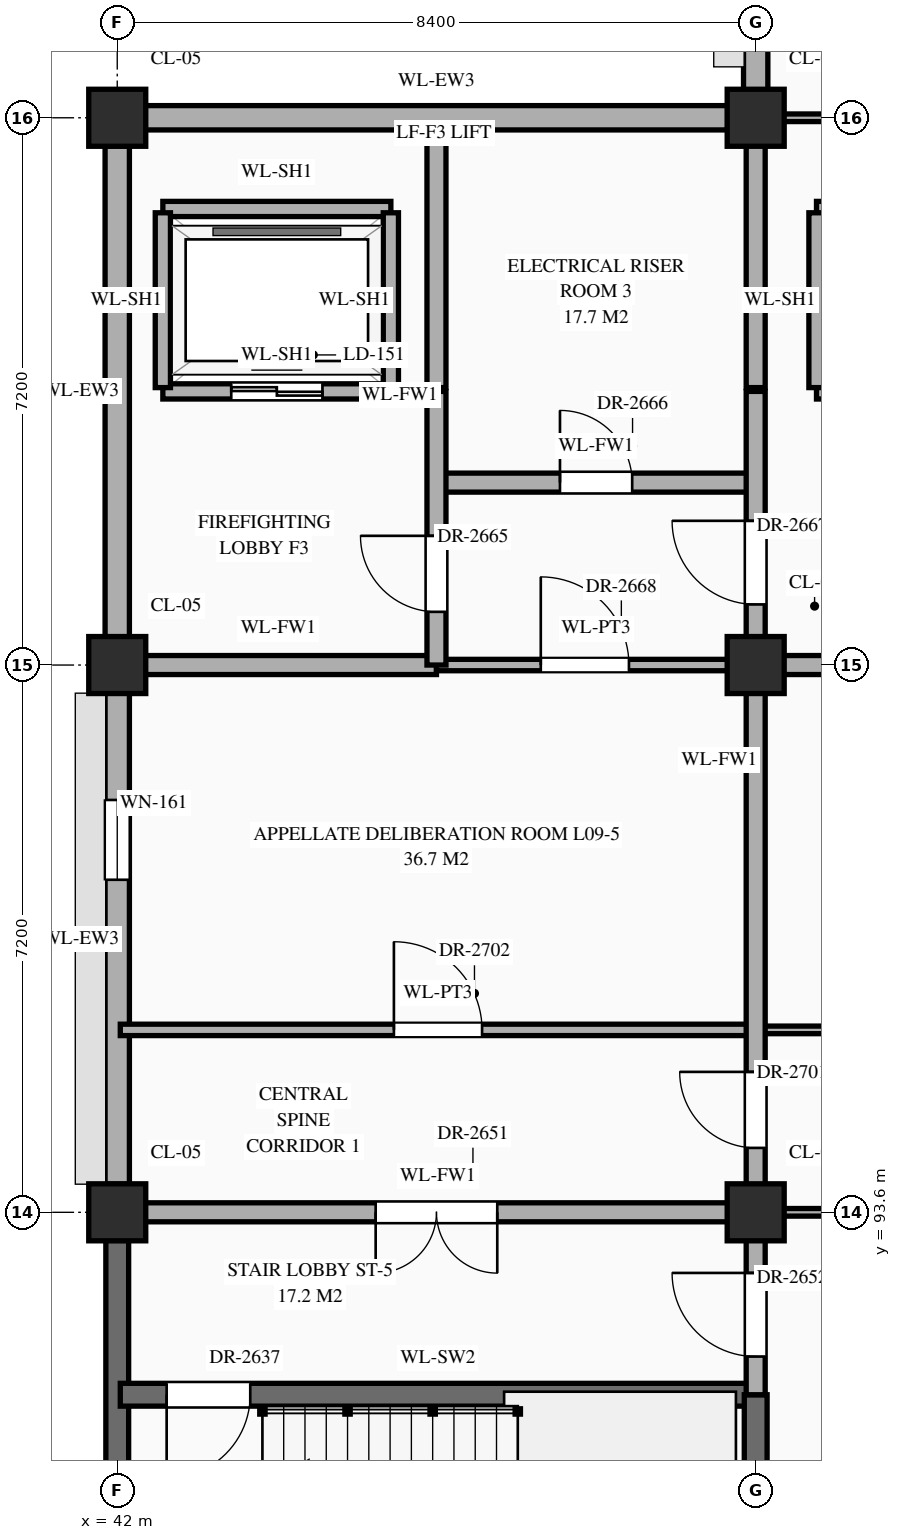
"""IFC4 building model, lengths in metres.
Left out: names, types, materials, properties, quantities, classifications, styles, units other than length and angle.
Written with IfcOpenShell. Run it as: python <this file> out.ifc"""

import sys

from ifc_helpers import new_model, si_unit, direction, frame, frame_2d, origin, origin_2d, place, context, subcontext, project, spatial, rectangle, extrude, element, fill, save


model = new_model("IFC4")
c1 = context("Model", 3, precision=1e-05, world=origin(), true_north=direction((0.0, 1.0)))
c2 = subcontext(c1, "Body", "Model", "MODEL_VIEW")
j1 = project(units=[si_unit("LENGTHUNIT", "METRE"), si_unit("PLANEANGLEUNIT", "RADIAN")], contexts=[c1])
p1 = place(None, origin())
s1 = spatial("IfcSite", under=j1, at=p1, CompositionType="ELEMENT")
p2 = place(p1, origin())
s2 = spatial("IfcBuilding", under=s1, at=p2, CompositionType="ELEMENT")
p3 = place(p2, frame((0.0, 0.0, 39.3)))
s3 = spatial("IfcBuildingStorey", under=s2, at=p3, CompositionType="ELEMENT", Elevation=39.3)
for number, where, z_axis, x_axis in (
    (1, (42.0, 93.6, 0.0), (0.0, 0.0, 1.0), (1.0, 0.0, 0.0)),
    (2, (42.0, 100.8, 0.0), (0.0, 0.0, 1.0), (1.0, 0.0, 0.0)),
    (3, (42.0, 108.0, 0.0), (0.0, 0.0, 1.0), (1.0, 0.0, 0.0)),
    (4, (50.4, 93.6, 0.0), (0.0, 0.0, 1.0), (1.0, 0.0, 0.0)),
    (5, (50.4, 100.8, 0.0), (0.0, 0.0, 1.0), (1.0, 0.0, 0.0)),
    (6, (50.4, 108.0, 0.0), (0.0, 0.0, 1.0), (1.0, 0.0, 0.0)),
):
    element("IfcColumn", number, at=place(p3, frame(where, z_axis=z_axis, x_axis=x_axis)), inside=s3, PredefinedType="COLUMN", context=c2, shape_type="SweptSolid", body=[
        extrude(rectangle(XDim=0.75, YDim=0.75, at=origin_2d()), origin(), (0.0, 0.0, 1.0), 4.2),
    ])
p4 = place(p3, frame((42.0, 86.77, 0.0), z_axis=(0.0, 0.0, 1.0), x_axis=(0.0, 1.0, 0.0)))
e7 = element("IfcWall", 7, at=p4, inside=s3, PredefinedType="SHEAR", context=c2, shape_type="SweptSolid", body=[
    extrude(rectangle(XDim=6.46, YDim=0.3, at=frame_2d((3.23, 0.0))), origin(), (0.0, 0.0, 1.0), 3.95),
])
p5 = place(p3, frame((42.0, 93.97, 0.0), z_axis=(0.0, 0.0, 1.0), x_axis=(0.0, 1.0, 0.0)))
e8 = element("IfcWall", 8, at=p5, inside=s3, PredefinedType="STANDARD", context=c2, shape_type="SweptSolid", body=[
    extrude(rectangle(XDim=6.46, YDim=0.32, at=frame_2d((3.23, 0.0))), origin(), (0.0, 0.0, 1.0), 3.3),
])
p6 = place(p5, frame((4.005, 0.0, 0.85)))
e9 = element("IfcOpeningElement", 9, at=p6, cuts=e8, PredefinedType="OPENING", context=c2, shape_type="SweptSolid", body=[
    extrude(rectangle(XDim=1.05, YDim=1.38, at=frame_2d((0.525, 0.69))), frame((0.0, 0.172, 0.0), z_axis=(0.0, -1.0, 0.0), x_axis=(1.0, 0.0, 0.0)), (0.0, 0.0, 1.0), 0.344),
])
p7 = place(p3, frame((42.37, 108.0, 0.0), z_axis=(0.0, 0.0, 1.0), x_axis=(1.0, 0.0, 0.0)))
e10 = element("IfcWall", 10, at=p7, inside=s3, PredefinedType="STANDARD", context=c2, shape_type="SweptSolid", body=[
    extrude(rectangle(XDim=7.66, YDim=0.32, at=frame_2d((3.83, 0.0))), origin(), (0.0, 0.0, 1.0), 3.3),
])
p8 = place(p3, frame((42.0, 101.17, 0.0), z_axis=(0.0, 0.0, 1.0), x_axis=(0.0, 1.0, 0.0)))
e11 = element("IfcWall", 11, at=p8, inside=s3, PredefinedType="STANDARD", context=c2, shape_type="SweptSolid", body=[
    extrude(rectangle(XDim=6.46, YDim=0.32, at=frame_2d((3.23, 0.0))), origin(), (0.0, 0.0, 1.0), 3.3),
])
p9 = place(p3, frame((50.4, 108.37, 0.0), z_axis=(0.0, 0.0, 1.0), x_axis=(0.0, 1.0, 0.0)))
e12 = element("IfcWall", 12, at=p9, inside=s3, PredefinedType="STANDARD", context=c2, shape_type="SweptSolid", body=[
    extrude(rectangle(XDim=6.46, YDim=0.32, at=frame_2d((3.23, 0.0))), origin(), (0.0, 0.0, 1.0), 3.3),
])
p10 = place(p9, frame((4.005, 0.0, 0.85)))
e13 = element("IfcOpeningElement", 13, at=p10, cuts=e12, PredefinedType="OPENING", context=c2, shape_type="SweptSolid", body=[
    extrude(rectangle(XDim=1.05, YDim=1.92, at=frame_2d((0.525, 0.96))), frame((0.0, 0.172, 0.0), z_axis=(0.0, -1.0, 0.0), x_axis=(1.0, 0.0, 0.0)), (0.0, 0.0, 1.0), 0.344),
])
p11 = place(p3, frame((42.04, 91.2, 0.0), z_axis=(0.0, 0.0, 1.0), x_axis=(1.0, 0.0, 0.0)))
e14 = element("IfcWall", 14, at=p11, inside=s3, PredefinedType="SHEAR", context=c2, shape_type="SweptSolid", body=[
    extrude(rectangle(XDim=8.36, YDim=0.3, at=frame_2d((4.18, 0.0))), origin(), (0.0, 0.0, 1.0), 3.95),
])
p12 = place(p11, frame((0.61, 0.0, 0.0)))
e15 = element("IfcOpeningElement", 15, at=p12, cuts=e14, PredefinedType="OPENING", context=c2, shape_type="SweptSolid", body=[
    extrude(rectangle(XDim=1.1, YDim=2.2, at=frame_2d((0.55, 1.1))), frame((0.0, 0.162, 0.0), z_axis=(0.0, -1.0, 0.0), x_axis=(1.0, 0.0, 0.0)), (0.0, 0.0, 1.0), 0.324),
])
p13 = place(p3, frame((42.04, 93.6, 0.0), z_axis=(0.0, 0.0, 1.0), x_axis=(1.0, 0.0, 0.0)))
e16 = element("IfcWall", 16, at=p13, inside=s3, PredefinedType="STANDARD", context=c2, shape_type="SweptSolid", body=[
    extrude(rectangle(XDim=8.36, YDim=0.25, at=frame_2d((4.18, 0.0))), origin(), (0.0, 0.0, 1.0), 3.1),
])
p14 = place(p13, frame((3.36, 0.0, 0.0)))
e17 = element("IfcOpeningElement", 17, at=p14, cuts=e16, PredefinedType="OPENING", context=c2, shape_type="SweptSolid", body=[
    extrude(rectangle(XDim=1.6, YDim=2.3, at=frame_2d((0.8, 1.15))), frame((0.0, 0.137, 0.0), z_axis=(0.0, -1.0, 0.0), x_axis=(1.0, 0.0, 0.0)), (0.0, 0.0, 1.0), 0.274),
])
p15 = place(p3, frame((50.4, 93.6, 0.0), z_axis=(0.0, 0.0, 1.0), x_axis=(1.0, 0.0, 0.0)))
e18 = element("IfcWall", 18, at=p15, inside=s3, PredefinedType="STANDARD", context=c2, shape_type="SweptSolid", body=[
    extrude(rectangle(XDim=8.4, YDim=0.1, at=frame_2d((4.2, 0.0))), origin(), (0.0, 0.0, 1.0), 3.1),
])
p16 = place(p15, frame((0.978, 0.0, 0.0)))
e19 = element("IfcOpeningElement", 19, at=p16, cuts=e18, PredefinedType="OPENING", context=c2, shape_type="SweptSolid", body=[
    extrude(rectangle(XDim=1.14, YDim=2.4, at=frame_2d((0.57, 1.2))), frame((0.0, 0.062, 0.0), z_axis=(0.0, -1.0, 0.0), x_axis=(1.0, 0.0, 0.0)), (0.0, 0.0, 1.0), 0.124),
])
p17 = place(p15, frame((3.75, 0.0, 0.0)))
e20 = element("IfcOpeningElement", 20, at=p17, cuts=e18, PredefinedType="OPENING", context=c2, shape_type="SweptSolid", body=[
    extrude(rectangle(XDim=0.9, YDim=2.15, at=frame_2d((0.45, 1.075))), frame((0.0, 0.062, 0.0), z_axis=(0.0, -1.0, 0.0), x_axis=(1.0, 0.0, 0.0)), (0.0, 0.0, 1.0), 0.124),
])
p18 = place(p15, frame((6.423, 0.0, 0.0)))
e21 = element("IfcOpeningElement", 21, at=p18, cuts=e18, PredefinedType="OPENING", context=c2, shape_type="SweptSolid", body=[
    extrude(rectangle(XDim=0.86, YDim=2.1, at=frame_2d((0.43, 1.05))), frame((0.0, 0.062, 0.0), z_axis=(0.0, -1.0, 0.0), x_axis=(1.0, 0.0, 0.0)), (0.0, 0.0, 1.0), 0.124),
])
p19 = place(p3, frame((42.04, 96.0, 0.0), z_axis=(0.0, 0.0, 1.0), x_axis=(1.0, 0.0, 0.0)))
e22 = element("IfcWall", 22, at=p19, inside=s3, PredefinedType="STANDARD", context=c2, shape_type="SweptSolid", body=[
    extrude(rectangle(XDim=8.36, YDim=0.15, at=frame_2d((4.18, 0.0))), origin(), (0.0, 0.0, 1.0), 3.95),
])
p20 = place(p19, frame((3.6, 0.0, 0.0)))
e23 = element("IfcOpeningElement", 23, at=p20, cuts=e22, PredefinedType="OPENING", context=c2, shape_type="SweptSolid", body=[
    extrude(rectangle(XDim=1.16, YDim=2.3, at=frame_2d((0.58, 1.15))), frame((0.0, 0.087, 0.0), z_axis=(0.0, -1.0, 0.0), x_axis=(1.0, 0.0, 0.0)), (0.0, 0.0, 1.0), 0.174),
])
p21 = place(p3, frame((50.4, 96.0, 0.0), z_axis=(0.0, 0.0, 1.0), x_axis=(1.0, 0.0, 0.0)))
e24 = element("IfcWall", 24, at=p21, inside=s3, PredefinedType="STANDARD", context=c2, shape_type="SweptSolid", body=[
    extrude(rectangle(XDim=5.8, YDim=0.1, at=frame_2d((2.9, 0.0))), origin(), (0.0, 0.0, 1.0), 3.95),
])
p22 = place(p21, frame((1.08, 0.0, 0.0)))
e25 = element("IfcOpeningElement", 25, at=p22, cuts=e24, PredefinedType="OPENING", context=c2, shape_type="SweptSolid", body=[
    extrude(rectangle(XDim=1.24, YDim=2.3, at=frame_2d((0.62, 1.15))), frame((0.0, 0.062, 0.0), z_axis=(0.0, -1.0, 0.0), x_axis=(1.0, 0.0, 0.0)), (0.0, 0.0, 1.0), 0.124),
])
p23 = place(p21, frame((3.96, 0.0, 0.0)))
e26 = element("IfcOpeningElement", 26, at=p23, cuts=e24, PredefinedType="OPENING", context=c2, shape_type="SweptSolid", body=[
    extrude(rectangle(XDim=1.28, YDim=2.35, at=frame_2d((0.64, 1.175))), frame((0.0, 0.062, 0.0), z_axis=(0.0, -1.0, 0.0), x_axis=(1.0, 0.0, 0.0)), (0.0, 0.0, 1.0), 0.124),
])
p24 = place(p3, frame((42.04, 100.8, 0.0), z_axis=(0.0, 0.0, 1.0), x_axis=(1.0, 0.0, 0.0)))
e27 = element("IfcWall", 27, at=p24, inside=s3, PredefinedType="STANDARD", context=c2, shape_type="SweptSolid", body=[
    extrude(rectangle(XDim=4.16, YDim=0.25, at=frame_2d((2.08, 0.0))), origin(), (0.0, 0.0, 1.0), 3.1),
])
p25 = place(p3, frame((46.2, 100.8, 0.0), z_axis=(0.0, 0.0, 1.0), x_axis=(1.0, 0.0, 0.0)))
e28 = element("IfcWall", 28, at=p25, inside=s3, PredefinedType="STANDARD", context=c2, shape_type="SweptSolid", body=[
    extrude(rectangle(XDim=4.2, YDim=0.15, at=frame_2d((2.1, 0.0))), origin(), (0.0, 0.0, 1.0), 3.1),
])
p26 = place(p25, frame((1.373, 0.0, 0.0)))
e29 = element("IfcOpeningElement", 29, at=p26, cuts=e28, PredefinedType="OPENING", context=c2, shape_type="SweptSolid", body=[
    extrude(rectangle(XDim=1.16, YDim=2.3, at=frame_2d((0.58, 1.15))), frame((0.0, 0.087, 0.0), z_axis=(0.0, -1.0, 0.0), x_axis=(1.0, 0.0, 0.0)), (0.0, 0.0, 1.0), 0.174),
])
p27 = place(p3, frame((50.4, 100.8, 0.0), z_axis=(0.0, 0.0, 1.0), x_axis=(1.0, 0.0, 0.0)))
e30 = element("IfcWall", 30, at=p27, inside=s3, PredefinedType="STANDARD", context=c2, shape_type="SweptSolid", body=[
    extrude(rectangle(XDim=3.4, YDim=0.25, at=frame_2d((1.7, 0.0))), origin(), (0.0, 0.0, 1.0), 3.1),
])
p28 = place(p27, frame((1.298, 0.0, 0.0)))
e31 = element("IfcOpeningElement", 31, at=p28, cuts=e30, PredefinedType="OPENING", context=c2, shape_type="SweptSolid", body=[
    extrude(rectangle(XDim=1.1, YDim=2.2, at=frame_2d((0.55, 1.1))), frame((0.0, 0.137, 0.0), z_axis=(0.0, -1.0, 0.0), x_axis=(1.0, 0.0, 0.0)), (0.0, 0.0, 1.0), 0.274),
])
p29 = place(p3, frame((46.2, 103.2, 0.0), z_axis=(0.0, 0.0, 1.0), x_axis=(1.0, 0.0, 0.0)))
e32 = element("IfcWall", 32, at=p29, inside=s3, PredefinedType="STANDARD", context=c2, shape_type="SweptSolid", body=[
    extrude(rectangle(XDim=4.2, YDim=0.25, at=frame_2d((2.1, 0.0))), origin(), (0.0, 0.0, 1.0), 3.95),
])
p30 = place(p29, frame((1.625, 0.0, 0.0)))
e33 = element("IfcOpeningElement", 33, at=p30, cuts=e32, PredefinedType="OPENING", context=c2, shape_type="SweptSolid", body=[
    extrude(rectangle(XDim=0.95, YDim=2.15, at=frame_2d((0.475, 1.075))), frame((0.0, 0.137, 0.0), z_axis=(0.0, -1.0, 0.0), x_axis=(1.0, 0.0, 0.0)), (0.0, 0.0, 1.0), 0.274),
])
p31 = place(p3, frame((42.6, 104.4, 0.0), z_axis=(0.0, 0.0, 1.0), x_axis=(1.0, 0.0, 0.0)))
e34 = element("IfcWall", 34, at=p31, inside=s3, PredefinedType="STANDARD", context=c2, shape_type="SweptSolid", body=[
    extrude(rectangle(XDim=3.0, YDim=0.2, at=frame_2d((1.5, 0.0))), origin(), (0.0, 0.0, 1.0), 3.95),
])
p32 = place(p31, frame((0.9, 0.0, 0.0)))
e35 = element("IfcOpeningElement", 35, at=p32, cuts=e34, PredefinedType="OPENING", context=c2, shape_type="SweptSolid", body=[
    extrude(rectangle(XDim=1.2, YDim=2.15, at=frame_2d((0.6, 1.075))), frame((0.0, 0.112, 0.0), z_axis=(0.0, -1.0, 0.0), x_axis=(1.0, 0.0, 0.0)), (0.0, 0.0, 1.0), 0.224),
])
p33 = place(p3, frame((51.2, 104.4, 0.0), z_axis=(0.0, 0.0, 1.0), x_axis=(1.0, 0.0, 0.0)))
e36 = element("IfcWall", 36, at=p33, inside=s3, PredefinedType="STANDARD", context=c2, shape_type="SweptSolid", body=[
    extrude(rectangle(XDim=2.4, YDim=0.2, at=frame_2d((1.2, 0.0))), origin(), (0.0, 0.0, 1.0), 3.95),
])
p34 = place(p33, frame((0.675, 0.0, 0.0)))
e37 = element("IfcOpeningElement", 37, at=p34, cuts=e36, PredefinedType="OPENING", context=c2, shape_type="SweptSolid", body=[
    extrude(rectangle(XDim=1.05, YDim=2.15, at=frame_2d((0.525, 1.075))), frame((0.0, 0.112, 0.0), z_axis=(0.0, -1.0, 0.0), x_axis=(1.0, 0.0, 0.0)), (0.0, 0.0, 1.0), 0.224),
])
p35 = place(p3, frame((42.6, 106.8, 0.0), z_axis=(0.0, 0.0, 1.0), x_axis=(1.0, 0.0, 0.0)))
e38 = element("IfcWall", 38, at=p35, inside=s3, PredefinedType="STANDARD", context=c2, shape_type="SweptSolid", body=[
    extrude(rectangle(XDim=3.0, YDim=0.2, at=frame_2d((1.5, 0.0))), origin(), (0.0, 0.0, 1.0), 3.95),
])
p36 = place(p3, frame((51.2, 106.8, 0.0), z_axis=(0.0, 0.0, 1.0), x_axis=(1.0, 0.0, 0.0)))
e39 = element("IfcWall", 39, at=p36, inside=s3, PredefinedType="STANDARD", context=c2, shape_type="SweptSolid", body=[
    extrude(rectangle(XDim=2.4, YDim=0.2, at=frame_2d((1.2, 0.0))), origin(), (0.0, 0.0, 1.0), 3.95),
])
p37 = place(p3, frame((50.45, 108.0, 0.0), z_axis=(0.0, 0.0, 1.0), x_axis=(1.0, 0.0, 0.0)))
e40 = element("IfcWall", 40, at=p37, inside=s3, PredefinedType="STANDARD", context=c2, shape_type="SweptSolid", body=[
    extrude(rectangle(XDim=4.1, YDim=0.1, at=frame_2d((2.05, 0.0))), origin(), (0.0, 0.0, 1.0), 3.1),
])
for number, where, z_axis, x_axis in (
    (41, (42.6, 104.45, 0.0), (0.0, 0.0, 1.0), (0.0, 1.0, 0.0)),
    (42, (45.6, 104.45, 0.0), (0.0, 0.0, 1.0), (0.0, 1.0, 0.0)),
):
    element("IfcWall", number, at=place(p3, frame(where, z_axis=z_axis, x_axis=x_axis)), inside=s3, PredefinedType="STANDARD", context=c2, shape_type="SweptSolid", body=[
        extrude(rectangle(XDim=2.3, YDim=0.2, at=frame_2d((1.15, 0.0))), origin(), (0.0, 0.0, 1.0), 3.95),
    ])
p38 = place(p3, frame((46.2, 100.8, 0.0), z_axis=(0.0, 0.0, 1.0), x_axis=(0.0, 1.0, 0.0)))
e43 = element("IfcWall", 43, at=p38, inside=s3, PredefinedType="STANDARD", context=c2, shape_type="SweptSolid", body=[
    extrude(rectangle(XDim=3.6, YDim=0.25, at=frame_2d((1.8, 0.0))), origin(), (0.0, 0.0, 1.0), 3.95),
])
p39 = place(p38, frame((0.7, 0.0, 0.0)))
e44 = element("IfcOpeningElement", 44, at=p39, cuts=e43, PredefinedType="OPENING", context=c2, shape_type="SweptSolid", body=[
    extrude(rectangle(XDim=1.0, YDim=2.2, at=frame_2d((0.5, 1.1))), frame((0.0, 0.137, 0.0), z_axis=(0.0, -1.0, 0.0), x_axis=(1.0, 0.0, 0.0)), (0.0, 0.0, 1.0), 0.274),
])
p40 = place(p3, frame((46.2, 104.45, 0.0), z_axis=(0.0, 0.0, 1.0), x_axis=(0.0, 1.0, 0.0)))
e45 = element("IfcWall", 45, at=p40, inside=s3, PredefinedType="STANDARD", context=c2, shape_type="SweptSolid", body=[
    extrude(rectangle(XDim=3.46, YDim=0.25, at=frame_2d((1.73, 0.0))), origin(), (0.0, 0.0, 1.0), 3.95),
])
p41 = place(p3, frame((50.4, 86.4, 0.0), z_axis=(0.0, 0.0, 1.0), x_axis=(0.0, 1.0, 0.0)))
e46 = element("IfcWall", 46, at=p41, inside=s3, PredefinedType="SHEAR", context=c2, shape_type="SweptSolid", body=[
    extrude(rectangle(XDim=4.8, YDim=0.3, at=frame_2d((2.4, 0.0))), origin(), (0.0, 0.0, 1.0), 3.95),
])
p42 = place(p3, frame((50.4, 91.2, 0.0), z_axis=(0.0, 0.0, 1.0), x_axis=(0.0, 1.0, 0.0)))
e47 = element("IfcWall", 47, at=p42, inside=s3, PredefinedType="STANDARD", context=c2, shape_type="SweptSolid", body=[
    extrude(rectangle(XDim=13.2, YDim=0.25, at=frame_2d((6.6, 0.0))), origin(), (0.0, 0.0, 1.0), 3.2),
])
p43 = place(p42, frame((0.502, 0.0, 0.0)))
e48 = element("IfcOpeningElement", 48, at=p43, cuts=e47, PredefinedType="OPENING", context=c2, shape_type="SweptSolid", body=[
    extrude(rectangle(XDim=1.1, YDim=2.2, at=frame_2d((0.55, 1.1))), frame((0.0, 0.137, 0.0), z_axis=(0.0, -1.0, 0.0), x_axis=(1.0, 0.0, 0.0)), (0.0, 0.0, 1.0), 0.274),
])
p44 = place(p42, frame((10.397, 0.0, 0.0)))
e49 = element("IfcOpeningElement", 49, at=p44, cuts=e47, PredefinedType="OPENING", context=c2, shape_type="SweptSolid", body=[
    extrude(rectangle(XDim=1.1, YDim=2.2, at=frame_2d((0.55, 1.1))), frame((0.0, 0.137, 0.0), z_axis=(0.0, -1.0, 0.0), x_axis=(1.0, 0.0, 0.0)), (0.0, 0.0, 1.0), 0.274),
])
p45 = place(p42, frame((3.248, 0.0, 0.0)))
e50 = element("IfcOpeningElement", 50, at=p45, cuts=e47, PredefinedType="OPENING", context=c2, shape_type="SweptSolid", body=[
    extrude(rectangle(XDim=1.0, YDim=2.2, at=frame_2d((0.5, 1.1))), frame((0.0, 0.137, 0.0), z_axis=(0.0, -1.0, 0.0), x_axis=(1.0, 0.0, 0.0)), (0.0, 0.0, 1.0), 0.274),
])
p46 = place(p3, frame((50.4, 104.45, 0.0), z_axis=(0.0, 0.0, 1.0), x_axis=(0.0, 1.0, 0.0)))
e51 = element("IfcWall", 51, at=p46, inside=s3, PredefinedType="STANDARD", context=c2, shape_type="SweptSolid", body=[
    extrude(rectangle(XDim=3.46, YDim=0.25, at=frame_2d((1.73, 0.0))), origin(), (0.0, 0.0, 1.0), 3.2),
])
p47 = place(p3, frame((51.2, 104.45, 0.0), z_axis=(0.0, 0.0, 1.0), x_axis=(0.0, 1.0, 0.0)))
e52 = element("IfcWall", 52, at=p47, inside=s3, PredefinedType="STANDARD", context=c2, shape_type="SweptSolid", body=[
    extrude(rectangle(XDim=2.3, YDim=0.2, at=frame_2d((1.15, 0.0))), origin(), (0.0, 0.0, 1.0), 3.95),
])
p48 = place(p6, origin())
e53 = element("IfcWindow", 53, at=p48, inside=s3, PartitioningType="SINGLE_PANEL", PredefinedType="WINDOW", context=c2, shape_type="SweptSolid", body=[
    extrude(rectangle(XDim=1.05, YDim=1.38, at=frame_2d((0.525, 0.69))), frame((0.0, 0.03, 0.0), z_axis=(0.0, -1.0, 0.0), x_axis=(1.0, 0.0, 0.0)), (0.0, 0.0, 1.0), 0.06),
])
fill(e9, e53)
p49 = place(p32, origin())
e54 = element("IfcDoor", 54, at=p49, inside=s3, OperationType="DOUBLE_DOOR_SLIDING", PredefinedType="DOOR", context=c2, shape_type="SweptSolid", body=[
    extrude(rectangle(XDim=1.2, YDim=2.15, at=frame_2d((0.6, 1.075))), frame((0.0, 0.025, 0.0), z_axis=(0.0, -1.0, 0.0), x_axis=(1.0, 0.0, 0.0)), (0.0, 0.0, 1.0), 0.05),
])
fill(e35, e54)
p50 = place(p12, frame((1.1, 0.0, 0.0), z_axis=(0.0, 0.0, 1.0), x_axis=(-1.0, 0.0, 0.0)))
e55 = element("IfcDoor", 55, at=p50, inside=s3, OperationType="SINGLE_SWING_RIGHT", PredefinedType="DOOR", context=c2, shape_type="SweptSolid", body=[
    extrude(rectangle(XDim=1.1, YDim=2.2, at=frame_2d((0.55, 1.1))), frame((0.0, 0.025, 0.0), z_axis=(0.0, -1.0, 0.0), x_axis=(1.0, 0.0, 0.0)), (0.0, 0.0, 1.0), 0.05),
])
fill(e15, e55)
p51 = place(p14, frame((1.6, 0.0, 0.0), z_axis=(0.0, 0.0, 1.0), x_axis=(-1.0, 0.0, 0.0)))
e56 = element("IfcDoor", 56, at=p51, inside=s3, OperationType="DOUBLE_DOOR_SINGLE_SWING", PredefinedType="DOOR", context=c2, shape_type="SweptSolid", body=[
    extrude(rectangle(XDim=1.6, YDim=2.3, at=frame_2d((0.8, 1.15))), frame((0.0, 0.025, 0.0), z_axis=(0.0, -1.0, 0.0), x_axis=(1.0, 0.0, 0.0)), (0.0, 0.0, 1.0), 0.05),
])
fill(e17, e56)
p52 = place(p43, origin())
e57 = element("IfcDoor", 57, at=p52, inside=s3, OperationType="SINGLE_SWING_RIGHT", PredefinedType="DOOR", context=c2, shape_type="SweptSolid", body=[
    extrude(rectangle(XDim=1.1, YDim=2.2, at=frame_2d((0.55, 1.1))), frame((0.0, 0.025, 0.0), z_axis=(0.0, -1.0, 0.0), x_axis=(1.0, 0.0, 0.0)), (0.0, 0.0, 1.0), 0.05),
])
fill(e48, e57)
p53 = place(p39, origin())
e58 = element("IfcDoor", 58, at=p53, inside=s3, OperationType="SINGLE_SWING_RIGHT", PredefinedType="DOOR", context=c2, shape_type="SweptSolid", body=[
    extrude(rectangle(XDim=1.0, YDim=2.2, at=frame_2d((0.5, 1.1))), frame((0.0, 0.025, 0.0), z_axis=(0.0, -1.0, 0.0), x_axis=(1.0, 0.0, 0.0)), (0.0, 0.0, 1.0), 0.05),
])
fill(e44, e58)
p54 = place(p30, origin())
e59 = element("IfcDoor", 59, at=p54, inside=s3, OperationType="SINGLE_SWING_LEFT", PredefinedType="DOOR", context=c2, shape_type="SweptSolid", body=[
    extrude(rectangle(XDim=0.95, YDim=2.15, at=frame_2d((0.475, 1.075))), frame((0.0, 0.025, 0.0), z_axis=(0.0, -1.0, 0.0), x_axis=(1.0, 0.0, 0.0)), (0.0, 0.0, 1.0), 0.05),
])
fill(e33, e59)
p55 = place(p44, origin())
e60 = element("IfcDoor", 60, at=p55, inside=s3, OperationType="SINGLE_SWING_RIGHT", PredefinedType="DOOR", context=c2, shape_type="SweptSolid", body=[
    extrude(rectangle(XDim=1.1, YDim=2.2, at=frame_2d((0.55, 1.1))), frame((0.0, 0.025, 0.0), z_axis=(0.0, -1.0, 0.0), x_axis=(1.0, 0.0, 0.0)), (0.0, 0.0, 1.0), 0.05),
])
fill(e49, e60)
p56 = place(p26, origin())
e61 = element("IfcDoor", 61, at=p56, inside=s3, OperationType="SINGLE_SWING_LEFT", PredefinedType="DOOR", context=c2, shape_type="SweptSolid", body=[
    extrude(rectangle(XDim=1.16, YDim=2.3, at=frame_2d((0.58, 1.15))), frame((0.0, 0.025, 0.0), z_axis=(0.0, -1.0, 0.0), x_axis=(1.0, 0.0, 0.0)), (0.0, 0.0, 1.0), 0.05),
])
fill(e29, e61)
p57 = place(p45, origin())
e62 = element("IfcDoor", 62, at=p57, inside=s3, OperationType="SINGLE_SWING_RIGHT", PredefinedType="DOOR", context=c2, shape_type="SweptSolid", body=[
    extrude(rectangle(XDim=1.0, YDim=2.2, at=frame_2d((0.5, 1.1))), frame((0.0, 0.025, 0.0), z_axis=(0.0, -1.0, 0.0), x_axis=(1.0, 0.0, 0.0)), (0.0, 0.0, 1.0), 0.05),
])
fill(e50, e62)
p58 = place(p20, origin())
e63 = element("IfcDoor", 63, at=p58, inside=s3, OperationType="SINGLE_SWING_LEFT", PredefinedType="DOOR", context=c2, shape_type="SweptSolid", body=[
    extrude(rectangle(XDim=1.16, YDim=2.3, at=frame_2d((0.58, 1.15))), frame((0.0, 0.025, 0.0), z_axis=(0.0, -1.0, 0.0), x_axis=(1.0, 0.0, 0.0)), (0.0, 0.0, 1.0), 0.05),
])
fill(e23, e63)
save(model, sys.argv[1])
